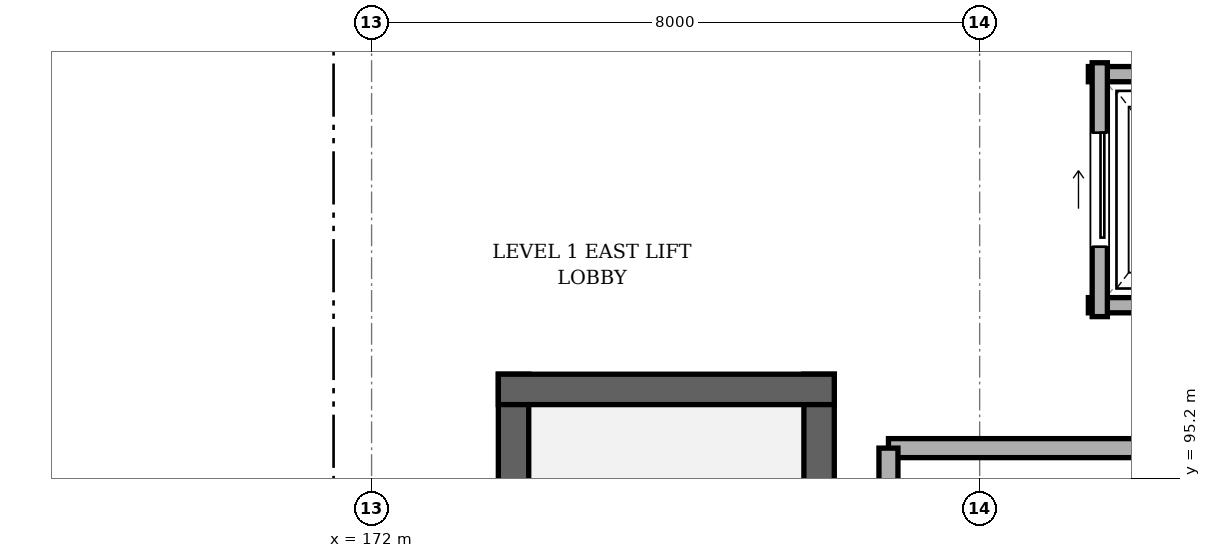
"""IFC4 building model, lengths in metres.
Left out: names, types, materials, properties, quantities, classifications, styles, units other than length and angle.
Written with IfcOpenShell. Run it as: python <this file> out.ifc"""

import sys

from ifc_helpers import new_model, si_unit, direction, frame, frame_2d, origin, place, context, subcontext, project, spatial, rectangle, extrude, element, fill, save


model = new_model("IFC4")
c1 = context("Model", 3, precision=1e-05, world=origin(), true_north=direction((0.0, 1.0)))
c2 = subcontext(c1, "Body", "Model", "MODEL_VIEW")
j1 = project(units=[si_unit("LENGTHUNIT", "METRE"), si_unit("PLANEANGLEUNIT", "RADIAN")], contexts=[c1])
p1 = place(None, origin())
s1 = spatial("IfcSite", under=j1, at=p1, CompositionType="ELEMENT")
p2 = place(p1, origin())
s2 = spatial("IfcBuilding", under=s1, at=p2, CompositionType="ELEMENT")
p3 = place(p2, frame((0.0, 0.0, 6.6)))
s3 = spatial("IfcBuildingStorey", under=s2, at=p3, CompositionType="ELEMENT", Elevation=6.6)
for number, where, z_axis, x_axis in (
    (1, (177.887, 85.975, 0.0), (0.0, 0.0, 1.0), (0.0, 1.0, 0.0)),
    (2, (173.867, 96.573, 0.0), (0.0, 0.0, 1.0), (0.0, -1.0, 0.0)),
):
    element("IfcWall", number, at=place(p3, frame(where, z_axis=z_axis, x_axis=x_axis)), inside=s3, PredefinedType="SHEAR", context=c2, shape_type="SweptSolid", body=[
        extrude(rectangle(XDim=10.597, YDim=0.4, at=frame_2d((5.299, 0.0))), origin(), (0.0, 0.0, 1.0), 3.98),
    ])
p4 = place(p3, frame((178.087, 96.373, 0.0), z_axis=(0.0, 0.0, 1.0), x_axis=(-1.0, 0.0, 0.0)))
e3 = element("IfcWall", 3, at=p4, inside=s3, PredefinedType="SHEAR", context=c2, shape_type="SweptSolid", body=[
    extrude(rectangle(XDim=4.42, YDim=0.4, at=frame_2d((2.21, 0.0))), origin(), (0.0, 0.0, 1.0), 3.98),
])
for number, where, z_axis, x_axis in (
    (4, (181.43, 97.48, 0.0), (0.0, 0.0, 1.0), (1.0, 0.0, 0.0)),
    (5, (184.17, 100.52, 0.0), (0.0, 0.0, 1.0), (-1.0, 0.0, 0.0)),
):
    element("IfcWall", number, at=place(p3, frame(where, z_axis=z_axis, x_axis=x_axis)), inside=s3, PredefinedType="SOLIDWALL", context=c2, shape_type="SweptSolid", body=[
        extrude(rectangle(XDim=2.74, YDim=0.2, at=frame_2d((1.37, 0.0))), origin(), (0.0, 0.0, 1.0), 3.955),
    ])
p5 = place(p3, frame((181.58, 100.67, 0.0), z_axis=(0.0, 0.0, 1.0), x_axis=(0.0, -1.0, 0.0)))
e6 = element("IfcWall", 6, at=p5, inside=s3, PredefinedType="SOLIDWALL", context=c2, shape_type="SweptSolid", body=[
    extrude(rectangle(XDim=3.34, YDim=0.2, at=frame_2d((1.67, 0.0))), origin(), (0.0, 0.0, 1.0), 3.955),
])
p6 = place(p5, frame((0.92, 0.0, 0.0)))
e7 = element("IfcOpeningElement", 7, at=p6, cuts=e6, PredefinedType="OPENING", context=c2, shape_type="SweptSolid", body=[
    extrude(rectangle(XDim=1.5, YDim=2.2, at=frame_2d((0.75, 1.1))), frame((0.0, 0.11, 0.0), z_axis=(0.0, -1.0, 0.0), x_axis=(1.0, 0.0, 0.0)), (0.0, 0.0, 1.0), 0.22),
])
p7 = place(p3, frame((178.8, 95.6, 0.0), z_axis=(0.0, 0.0, 1.0), x_axis=(1.0, 0.0, 0.0)))
e8 = element("IfcWall", 8, at=p7, inside=s3, PredefinedType="SOLIDWALL", context=c2, shape_type="SweptSolid", body=[
    extrude(rectangle(XDim=8.4, YDim=0.25, at=frame_2d((4.2, 0.0))), origin(), (0.0, 0.0, 1.0), 3.495),
])
p8 = place(p7, frame((3.6, 0.0, 0.0)))
e9 = element("IfcOpeningElement", 9, at=p8, cuts=e8, PredefinedType="OPENING", context=c2, shape_type="SweptSolid", body=[
    extrude(rectangle(XDim=1.2, YDim=2.1, at=frame_2d((0.6, 1.05))), frame((0.0, 0.135, 0.0), z_axis=(0.0, -1.0, 0.0), x_axis=(1.0, 0.0, 0.0)), (0.0, 0.0, 1.0), 0.27),
])
p9 = place(p3, frame((178.8, 86.4, 0.0), z_axis=(0.0, 0.0, 1.0), x_axis=(0.0, 1.0, 0.0)))
e10 = element("IfcWall", 10, at=p9, inside=s3, PredefinedType="SOLIDWALL", context=c2, shape_type="SweptSolid", body=[
    extrude(rectangle(XDim=9.2, YDim=0.25, at=frame_2d((4.6, 0.0))), origin(), (0.0, 0.0, 1.0), 3.515),
])
p10 = place(p6, origin())
e11 = element("IfcDoor", 11, at=p10, inside=s3, OperationType="SLIDING_TO_LEFT", PredefinedType="DOOR", context=c2, shape_type="SweptSolid", body=[
    extrude(rectangle(XDim=1.5, YDim=2.2, at=frame_2d((0.75, 1.1))), frame((0.0, 0.025, 0.0), z_axis=(0.0, -1.0, 0.0), x_axis=(1.0, 0.0, 0.0)), (0.0, 0.0, 1.0), 0.05),
])
fill(e7, e11)
save(model, sys.argv[1])
